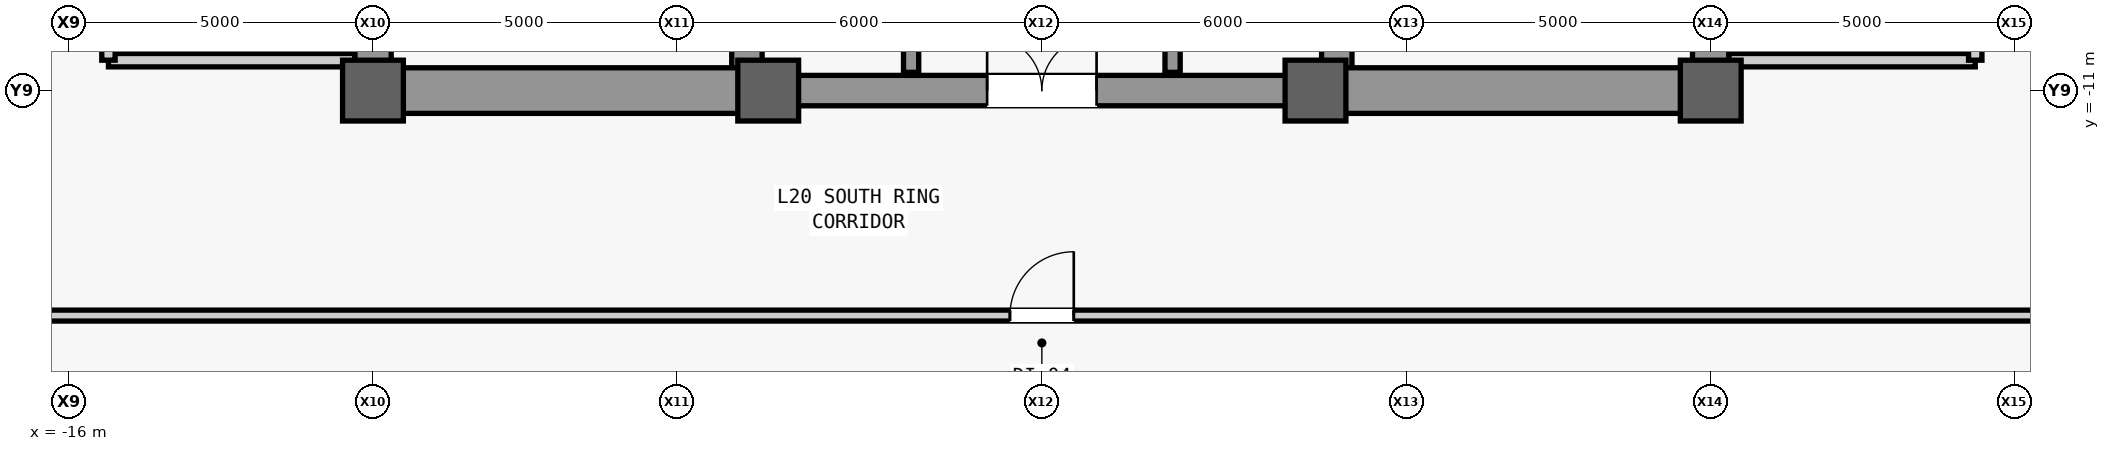
"""IFC4 building model, lengths in metres.
Left out: names, types, materials, properties, quantities, classifications, styles, units other than length and angle.
Written with IfcOpenShell. Run it as: python <this file> out.ifc"""

import sys

from ifc_helpers import new_model, si_unit, direction, frame, frame_2d, origin, origin_2d, place, context, subcontext, project, spatial, rectangle, extrude, source, transform, mapped, element, fill, save


model = new_model("IFC4")
c1 = context("Model", 3, precision=1e-05, world=origin(), true_north=direction((0.0, 1.0)))
c2 = subcontext(c1, "Body", "Model", "MODEL_VIEW")
j1 = project(units=[si_unit("LENGTHUNIT", "METRE"), si_unit("PLANEANGLEUNIT", "RADIAN")], contexts=[c1])
p1 = place(None, origin())
s1 = spatial("IfcSite", under=j1, at=p1, CompositionType="ELEMENT")
p2 = place(p1, origin())
s2 = spatial("IfcBuilding", under=s1, at=p2, CompositionType="ELEMENT")
p3 = place(p2, frame((0.0, 0.0, 91.4)))
s3 = spatial("IfcBuildingStorey", under=s2, at=p3, CompositionType="ELEMENT", Elevation=91.4)
m1 = source(origin(), c2, "Body", "SweptSolid", [
    extrude(rectangle(XDim=22.0, YDim=0.6, at=frame_2d((11.0, 0.0))), origin(), (0.0, 0.0, 1.0), 3.84),
])
p4 = place(p3, frame((-11.0, -11.0, 0.0), z_axis=(0.0, 0.0, 1.0), x_axis=(0.0, 1.0, 0.0)))
e1 = element("IfcWall", 1, at=p4, inside=s3, PredefinedType="SHEAR", context=c2, shape_type="MappedRepresentation", body=[
    mapped(m1, transform((0.0, 0.0, 0.0), scale=1.0)),
])
m2 = source(origin(), c2, "Body", "SweptSolid", [
    extrude(rectangle(XDim=1.1, YDim=2.2, at=frame_2d((0.55, 1.1))), frame((0.0, 0.31, 0.0), z_axis=(0.0, -1.0, 0.0), x_axis=(1.0, 0.0, 0.0)), (0.0, 0.0, 1.0), 0.62),
])
p5 = place(p4, frame((0.8, 0.0, 0.0)))
e2 = element("IfcOpeningElement", 2, at=p5, cuts=e1, PredefinedType="OPENING", context=c2, shape_type="MappedRepresentation", body=[
    mapped(m2, transform((0.0, 0.0, 0.0), scale=1.0)),
])
p6 = place(p4, frame((12.5, 0.0, 0.0)))
e3 = element("IfcOpeningElement", 3, at=p6, cuts=e1, PredefinedType="OPENING", context=c2, shape_type="MappedRepresentation", body=[
    mapped(m2, transform((0.0, 0.0, 0.0), scale=1.0)),
])
m3 = source(origin(), c2, "Body", "SweptSolid", [
    extrude(rectangle(XDim=0.9, YDim=2.15, at=frame_2d((0.45, 1.075))), frame((0.0, 0.31, 0.0), z_axis=(0.0, -1.0, 0.0), x_axis=(1.0, 0.0, 0.0)), (0.0, 0.0, 1.0), 0.62),
])
p7 = place(p4, frame((6.2, 0.0, 0.0)))
e4 = element("IfcOpeningElement", 4, at=p7, cuts=e1, PredefinedType="OPENING", context=c2, shape_type="MappedRepresentation", body=[
    mapped(m3, transform((0.0, 0.0, 0.0), scale=1.0)),
])
p8 = place(p4, frame((8.05, 0.0, 0.0)))
e5 = element("IfcOpeningElement", 5, at=p8, cuts=e1, PredefinedType="OPENING", context=c2, shape_type="MappedRepresentation", body=[
    mapped(m3, transform((0.0, 0.0, 0.0), scale=1.0)),
])
m4 = source(origin(), c2, "Body", "SweptSolid", [
    extrude(rectangle(XDim=1.3, YDim=2.3, at=frame_2d((0.65, 1.15))), frame((0.0, 0.31, 0.0), z_axis=(0.0, -1.0, 0.0), x_axis=(1.0, 0.0, 0.0)), (0.0, 0.0, 1.0), 0.62),
])
p9 = place(p4, frame((2.7, 0.0, 0.0)))
e6 = element("IfcOpeningElement", 6, at=p9, cuts=e1, PredefinedType="OPENING", context=c2, shape_type="MappedRepresentation", body=[
    mapped(m4, transform((0.0, 0.0, 0.0), scale=1.0)),
])
p10 = place(p3, frame((11.0, -11.0, 0.0), z_axis=(0.0, 0.0, 1.0), x_axis=(0.0, 1.0, 0.0)))
e7 = element("IfcWall", 7, at=p10, inside=s3, PredefinedType="SHEAR", context=c2, shape_type="MappedRepresentation", body=[
    mapped(m1, transform((0.0, 0.0, 0.0), scale=1.0)),
])
p11 = place(p10, frame((0.8, 0.0, 0.0)))
e8 = element("IfcOpeningElement", 8, at=p11, cuts=e7, PredefinedType="OPENING", context=c2, shape_type="MappedRepresentation", body=[
    mapped(m2, transform((0.0, 0.0, 0.0), scale=1.0)),
])
p12 = place(p10, frame((6.85, 0.0, 0.0)))
e9 = element("IfcOpeningElement", 9, at=p12, cuts=e7, PredefinedType="OPENING", context=c2, shape_type="MappedRepresentation", body=[
    mapped(m3, transform((0.0, 0.0, 0.0), scale=1.0)),
])
p13 = place(p10, frame((2.7, 0.0, 0.0)))
e10 = element("IfcOpeningElement", 10, at=p13, cuts=e7, PredefinedType="OPENING", context=c2, shape_type="MappedRepresentation", body=[
    mapped(m4, transform((0.0, 0.0, 0.0), scale=1.0)),
])
p14 = place(p10, frame((13.35, 0.0, 0.0)))
e11 = element("IfcOpeningElement", 11, at=p14, cuts=e7, PredefinedType="OPENING", context=c2, shape_type="MappedRepresentation", body=[
    mapped(m4, transform((0.0, 0.0, 0.0), scale=1.0)),
])
m5 = source(origin(), c2, "Body", "SweptSolid", [
    extrude(rectangle(XDim=21.4, YDim=0.5, at=frame_2d((10.7, 0.0))), origin(), (0.0, 0.0, 1.0), 3.84),
])
for number, where, z_axis, x_axis in (
    (12, (-4.85, -10.7, 0.0), (0.0, 0.0, 1.0), (0.0, 1.0, 0.0)),
    (13, (4.85, -10.7, 0.0), (0.0, 0.0, 1.0), (0.0, 1.0, 0.0)),
):
    element("IfcWall", number, at=place(p3, frame(where, z_axis=z_axis, x_axis=x_axis)), inside=s3, PredefinedType="SHEAR", context=c2, shape_type="MappedRepresentation", body=[
        mapped(m5, transform((0.0, 0.0, 0.0), scale=1.0)),
    ])
m6 = source(origin(), c2, "Body", "SweptSolid", [
    extrude(rectangle(XDim=5.85, YDim=0.75, at=frame_2d((2.925, 0.0))), origin(), (0.0, 0.0, 1.0), 3.84),
])
for number, where, z_axis, x_axis in (
    (14, (-10.7, -11.0, 0.0), (0.0, 0.0, 1.0), (1.0, 0.0, 0.0)),
    (15, (4.85, -11.0, 0.0), (0.0, 0.0, 1.0), (1.0, 0.0, 0.0)),
):
    element("IfcWall", number, at=place(p3, frame(where, z_axis=z_axis, x_axis=x_axis)), inside=s3, PredefinedType="SHEAR", context=c2, shape_type="MappedRepresentation", body=[
        mapped(m6, transform((0.0, 0.0, 0.0), scale=1.0)),
    ])
m7 = source(origin(), c2, "Body", "SweptSolid", [
    extrude(rectangle(XDim=9.2, YDim=0.5, at=frame_2d((4.6, 0.0))), origin(), (0.0, 0.0, 1.0), 3.84),
])
p15 = place(p3, frame((-4.6, -11.0, 0.0), z_axis=(0.0, 0.0, 1.0), x_axis=(1.0, 0.0, 0.0)))
e16 = element("IfcWall", 16, at=p15, inside=s3, PredefinedType="SHEAR", context=c2, shape_type="MappedRepresentation", body=[
    mapped(m7, transform((0.0, 0.0, 0.0), scale=1.0)),
])
m8 = source(origin(), c2, "Body", "SweptSolid", [
    extrude(rectangle(XDim=1.8, YDim=2.25, at=frame_2d((0.9, 1.125))), frame((0.0, 0.26, 0.0), z_axis=(0.0, -1.0, 0.0), x_axis=(1.0, 0.0, 0.0)), (0.0, 0.0, 1.0), 0.52),
])
p16 = place(p15, frame((3.7, 0.0, 0.0)))
e17 = element("IfcOpeningElement", 17, at=p16, cuts=e16, PredefinedType="OPENING", context=c2, shape_type="MappedRepresentation", body=[
    mapped(m8, transform((0.0, 0.0, 0.0), scale=1.0)),
])
m9 = source(origin(), c2, "Body", "SweptSolid", [
    extrude(rectangle(XDim=1.0, YDim=1.0, at=origin_2d()), origin(), (0.0, 0.0, 1.0), 4.1),
])
for number, where, z_axis, x_axis in (
    (18, (-11.0, -11.0, 0.0), (0.0, 0.0, 1.0), (1.0, 0.0, 0.0)),
    (19, (-4.5, -11.0, 0.0), (0.0, 0.0, 1.0), (1.0, 0.0, 0.0)),
    (20, (4.5, -11.0, 0.0), (0.0, 0.0, 1.0), (1.0, 0.0, 0.0)),
    (21, (11.0, -11.0, 0.0), (0.0, 0.0, 1.0), (1.0, 0.0, 0.0)),
):
    element("IfcColumn", number, at=place(p3, frame(where, z_axis=z_axis, x_axis=x_axis)), inside=s3, PredefinedType="COLUMN", context=c2, shape_type="MappedRepresentation", body=[
        mapped(m9, transform((0.0, 0.0, 0.0), scale=1.0)),
    ])
m10 = source(origin(), c2, "Body", "SweptSolid", [
    extrude(rectangle(XDim=4.05, YDim=0.22, at=frame_2d((2.025, 0.0))), origin(), (0.0, 0.0, 1.0), 3.84),
])
p17 = place(p3, frame((-15.35, -10.5, 0.0), z_axis=(0.0, 0.0, 1.0), x_axis=(1.0, 0.0, 0.0)))
e22 = element("IfcWall", 22, at=p17, inside=s3, PredefinedType="PARTITIONING", context=c2, shape_type="MappedRepresentation", body=[
    mapped(m10, transform((0.0, 0.0, 0.0), scale=1.0)),
])
m11 = source(origin(), c2, "Body", "SweptSolid", [
    extrude(rectangle(XDim=4.4, YDim=0.22, at=frame_2d((2.2, 0.0))), origin(), (0.0, 0.0, 1.0), 3.84),
])
p18 = place(p3, frame((-15.35, -10.5, 0.0), z_axis=(0.0, 0.0, 1.0), x_axis=(0.0, 1.0, 0.0)))
e23 = element("IfcWall", 23, at=p18, inside=s3, PredefinedType="PARTITIONING", context=c2, shape_type="MappedRepresentation", body=[
    mapped(m11, transform((0.0, 0.0, 0.0), scale=1.0)),
])
m12 = source(origin(), c2, "Body", "SweptSolid", [
    extrude(rectangle(XDim=1.2, YDim=2.2, at=frame_2d((0.6, 1.1))), frame((0.0, 0.12, 0.0), z_axis=(0.0, -1.0, 0.0), x_axis=(1.0, 0.0, 0.0)), (0.0, 0.0, 1.0), 0.24),
])
p19 = place(p18, frame((1.6, 0.0, 0.0)))
e24 = element("IfcOpeningElement", 24, at=p19, cuts=e23, PredefinedType="OPENING", context=c2, shape_type="MappedRepresentation", body=[
    mapped(m12, transform((0.0, 0.0, 0.0), scale=1.0)),
])
p20 = place(p3, frame((11.3, -10.5, 0.0), z_axis=(0.0, 0.0, 1.0), x_axis=(1.0, 0.0, 0.0)))
e25 = element("IfcWall", 25, at=p20, inside=s3, PredefinedType="PARTITIONING", context=c2, shape_type="MappedRepresentation", body=[
    mapped(m10, transform((0.0, 0.0, 0.0), scale=1.0)),
])
p21 = place(p3, frame((15.35, -10.5, 0.0), z_axis=(0.0, 0.0, 1.0), x_axis=(0.0, 1.0, 0.0)))
e26 = element("IfcWall", 26, at=p21, inside=s3, PredefinedType="PARTITIONING", context=c2, shape_type="MappedRepresentation", body=[
    mapped(m11, transform((0.0, 0.0, 0.0), scale=1.0)),
])
p22 = place(p21, frame((1.6, 0.0, 0.0)))
e27 = element("IfcOpeningElement", 27, at=p22, cuts=e26, PredefinedType="OPENING", context=c2, shape_type="MappedRepresentation", body=[
    mapped(m12, transform((0.0, 0.0, 0.0), scale=1.0)),
])
m13 = source(origin(), c2, "Body", "SweptSolid", [
    extrude(rectangle(XDim=5.4, YDim=0.25, at=frame_2d((2.7, 0.0))), origin(), (0.0, 0.0, 1.0), 3.84),
])
p23 = place(p3, frame((-2.15, -10.7, 0.0), z_axis=(0.0, 0.0, 1.0), x_axis=(0.0, 1.0, 0.0)))
e28 = element("IfcWall", 28, at=p23, inside=s3, PredefinedType="SHEAR", context=c2, shape_type="MappedRepresentation", body=[
    mapped(m13, transform((0.0, 0.0, 0.0), scale=1.0)),
])
m14 = source(origin(), c2, "Body", "SweptSolid", [
    extrude(rectangle(XDim=1.2, YDim=2.3, at=frame_2d((0.6, 1.15))), frame((0.0, 0.135, 0.0), z_axis=(0.0, -1.0, 0.0), x_axis=(1.0, 0.0, 0.0)), (0.0, 0.0, 1.0), 0.27),
])
p24 = place(p23, frame((0.9, 0.0, 0.0)))
e29 = element("IfcOpeningElement", 29, at=p24, cuts=e28, PredefinedType="OPENING", context=c2, shape_type="MappedRepresentation", body=[
    mapped(m14, transform((0.0, 0.0, 0.0), scale=1.0)),
])
p25 = place(p23, frame((3.2, 0.0, 0.0)))
e30 = element("IfcOpeningElement", 30, at=p25, cuts=e28, PredefinedType="OPENING", context=c2, shape_type="MappedRepresentation", body=[
    mapped(m14, transform((0.0, 0.0, 0.0), scale=1.0)),
])
p26 = place(p3, frame((2.15, -10.7, 0.0), z_axis=(0.0, 0.0, 1.0), x_axis=(0.0, 1.0, 0.0)))
e31 = element("IfcWall", 31, at=p26, inside=s3, PredefinedType="SHEAR", context=c2, shape_type="MappedRepresentation", body=[
    mapped(m13, transform((0.0, 0.0, 0.0), scale=1.0)),
])
p27 = place(p26, frame((0.9, 0.0, 0.0)))
e32 = element("IfcOpeningElement", 32, at=p27, cuts=e31, PredefinedType="OPENING", context=c2, shape_type="MappedRepresentation", body=[
    mapped(m14, transform((0.0, 0.0, 0.0), scale=1.0)),
])
p28 = place(p26, frame((3.2, 0.0, 0.0)))
e33 = element("IfcOpeningElement", 33, at=p28, cuts=e31, PredefinedType="OPENING", context=c2, shape_type="MappedRepresentation", body=[
    mapped(m14, transform((0.0, 0.0, 0.0), scale=1.0)),
])
m15 = source(origin(), c2, "Body", "SweptSolid", [
    extrude(rectangle(XDim=37.1, YDim=0.18, at=frame_2d((18.55, 0.0))), origin(), (0.0, 0.0, 1.0), 3.84),
])
p29 = place(p3, frame((-19.4, -14.7, 0.0), z_axis=(0.0, 0.0, 1.0), x_axis=(1.0, 0.0, 0.0)))
e34 = element("IfcWall", 34, at=p29, inside=s3, PredefinedType="PARTITIONING", context=c2, shape_type="MappedRepresentation", body=[
    mapped(m15, transform((0.0, 0.0, 0.0), scale=1.0)),
])
m16 = source(origin(), c2, "Body", "SweptSolid", [
    extrude(rectangle(XDim=1.05, YDim=2.2, at=frame_2d((0.525, 1.1))), frame((0.0, 0.1, 0.0), z_axis=(0.0, -1.0, 0.0), x_axis=(1.0, 0.0, 0.0)), (0.0, 0.0, 1.0), 0.2),
])
p30 = place(p29, frame((18.875, 0.0, 0.0)))
e35 = element("IfcOpeningElement", 35, at=p30, cuts=e34, PredefinedType="OPENING", context=c2, shape_type="MappedRepresentation", body=[
    mapped(m16, transform((0.0, 0.0, 0.0), scale=1.0)),
])
m17 = source(origin(), c2, "Body", "SweptSolid", [
    extrude(rectangle(XDim=1.8, YDim=2.25, at=frame_2d((0.9, 1.125))), frame((0.0, 0.025, 0.0), z_axis=(0.0, -1.0, 0.0), x_axis=(1.0, 0.0, 0.0)), (0.0, 0.0, 1.0), 0.05),
])
p31 = place(p16, origin())
e36 = element("IfcDoor", 36, at=p31, inside=s3, OperationType="SINGLE_SWING_LEFT", PredefinedType="DOOR", context=c2, shape_type="MappedRepresentation", body=[
    mapped(m17, transform((0.0, 0.0, 0.0), scale=1.0)),
])
fill(e17, e36)
m18 = source(origin(), c2, "Body", "SweptSolid", [
    extrude(rectangle(XDim=1.05, YDim=2.2, at=frame_2d((0.525, 1.1))), frame((0.0, 0.025, 0.0), z_axis=(0.0, -1.0, 0.0), x_axis=(1.0, 0.0, 0.0)), (0.0, 0.0, 1.0), 0.05),
])
p32 = place(p30, origin())
e37 = element("IfcDoor", 37, at=p32, inside=s3, OperationType="SINGLE_SWING_RIGHT", PredefinedType="DOOR", context=c2, shape_type="MappedRepresentation", body=[
    mapped(m18, transform((0.0, 0.0, 0.0), scale=1.0)),
])
fill(e35, e37)
save(model, sys.argv[1])
